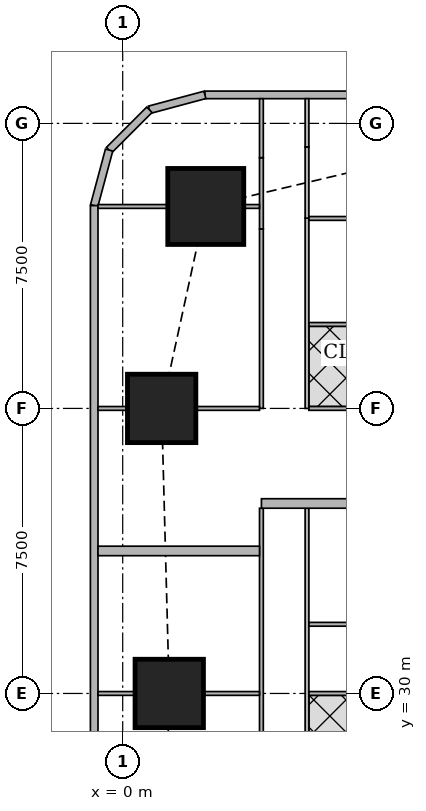
"""IFC4 building model, lengths in metres.
Left out: names, types, materials, properties, quantities, classifications, styles, units other than length and angle.
Written with IfcOpenShell. Run it as: python <this file> out.ifc"""

import sys

from ifc_helpers import new_model, si_unit, direction, frame, frame_2d, origin, origin_2d, place, context, subcontext, project, spatial, rectangle, extrude, element, fill, save


model = new_model("IFC4")
c1 = context("Model", 3, precision=1e-05, world=origin(), true_north=direction((0.0, 1.0)))
c2 = subcontext(c1, "Body", "Model", "MODEL_VIEW")
j1 = project(units=[si_unit("LENGTHUNIT", "METRE"), si_unit("PLANEANGLEUNIT", "RADIAN")], contexts=[c1])
p1 = place(None, origin())
s1 = spatial("IfcSite", under=j1, at=p1, CompositionType="ELEMENT")
p2 = place(p1, origin())
s2 = spatial("IfcBuilding", under=s1, at=p2, CompositionType="ELEMENT")
p3 = place(p2, frame((0.0, 0.0, 169.55)))
s3 = spatial("IfcBuildingStorey", under=s2, at=p3, CompositionType="ELEMENT", Elevation=169.55)
for number, where, z_axis, x_axis in (
    (1, (1.225, 30.0, 0.0), (0.0, 0.0, 1.0), (1.0, 0.0, 0.0)),
    (2, (1.025, 37.5, 0.0), (0.0, 0.0, 1.0), (1.0, 0.0, 0.0)),
):
    element("IfcColumn", number, at=place(p3, frame(where, z_axis=z_axis, x_axis=x_axis)), inside=s3, PredefinedType="COLUMN", context=c2, shape_type="SweptSolid", body=[
        extrude(rectangle(XDim=1.8, YDim=1.8, at=origin_2d()), origin(), (0.0, 0.0, 1.0), 3.75),
    ])
p4 = place(p3, frame((2.186, 42.814, 0.0), z_axis=(0.0, 0.0, 1.0), x_axis=(1.0, 0.0, 0.0)))
e3 = element("IfcColumn", 3, at=p4, inside=s3, PredefinedType="COLUMN", context=c2, shape_type="SweptSolid", body=[
    extrude(rectangle(XDim=2.0, YDim=2.0, at=origin_2d()), origin(), (0.0, 0.0, 1.0), 3.75),
])
p5 = place(p3, frame((40.106, 45.75, 0.0), z_axis=(0.0, 0.0, 1.0), x_axis=(-1.0, 0.0, 0.0)))
e4 = element("IfcWall", 4, at=p5, inside=s3, PredefinedType="SOLIDWALL", context=c2, shape_type="SweptSolid", body=[
    extrude(rectangle(XDim=37.943, YDim=0.2, at=frame_2d((18.971, 0.0))), origin(), (0.0, 0.0, 1.0), 3.5),
])
p6 = place(p5, frame((8.606, 0.0, 0.9)))
e5 = element("IfcOpeningElement", 5, at=p6, cuts=e4, PredefinedType="OPENING", context=c2, shape_type="SweptSolid", body=[
    extrude(rectangle(XDim=1.8, YDim=1.5, at=frame_2d((0.9, 0.75))), frame((0.0, 0.11, 0.0), z_axis=(0.0, -1.0, 0.0), x_axis=(1.0, 0.0, 0.0)), (0.0, 0.0, 1.0), 0.22),
])
p7 = place(p5, frame((12.206, 0.0, 0.9)))
e6 = element("IfcOpeningElement", 6, at=p7, cuts=e4, PredefinedType="OPENING", context=c2, shape_type="SweptSolid", body=[
    extrude(rectangle(XDim=1.8, YDim=1.5, at=frame_2d((0.9, 0.75))), frame((0.0, 0.11, 0.0), z_axis=(0.0, -1.0, 0.0), x_axis=(1.0, 0.0, 0.0)), (0.0, 0.0, 1.0), 0.22),
])
p8 = place(p5, frame((15.806, 0.0, 0.9)))
e7 = element("IfcOpeningElement", 7, at=p8, cuts=e4, PredefinedType="OPENING", context=c2, shape_type="SweptSolid", body=[
    extrude(rectangle(XDim=1.8, YDim=1.5, at=frame_2d((0.9, 0.75))), frame((0.0, 0.11, 0.0), z_axis=(0.0, -1.0, 0.0), x_axis=(1.0, 0.0, 0.0)), (0.0, 0.0, 1.0), 0.22),
])
p9 = place(p5, frame((19.406, 0.0, 0.9)))
e8 = element("IfcOpeningElement", 8, at=p9, cuts=e4, PredefinedType="OPENING", context=c2, shape_type="SweptSolid", body=[
    extrude(rectangle(XDim=1.8, YDim=1.5, at=frame_2d((0.9, 0.75))), frame((0.0, 0.11, 0.0), z_axis=(0.0, -1.0, 0.0), x_axis=(1.0, 0.0, 0.0)), (0.0, 0.0, 1.0), 0.22),
])
p10 = place(p5, frame((23.006, 0.0, 0.9)))
e9 = element("IfcOpeningElement", 9, at=p10, cuts=e4, PredefinedType="OPENING", context=c2, shape_type="SweptSolid", body=[
    extrude(rectangle(XDim=1.8, YDim=1.5, at=frame_2d((0.9, 0.75))), frame((0.0, 0.11, 0.0), z_axis=(0.0, -1.0, 0.0), x_axis=(1.0, 0.0, 0.0)), (0.0, 0.0, 1.0), 0.22),
])
p11 = place(p5, frame((26.606, 0.0, 0.9)))
e10 = element("IfcOpeningElement", 10, at=p11, cuts=e4, PredefinedType="OPENING", context=c2, shape_type="SweptSolid", body=[
    extrude(rectangle(XDim=1.8, YDim=1.5, at=frame_2d((0.9, 0.75))), frame((0.0, 0.11, 0.0), z_axis=(0.0, -1.0, 0.0), x_axis=(1.0, 0.0, 0.0)), (0.0, 0.0, 1.0), 0.22),
])
p12 = place(p3, frame((2.163, 45.75, 0.0), z_axis=(0.0, 0.0, 1.0), x_axis=(-0.965832000415, -0.259168954497, 0.0)))
e11 = element("IfcWall", 11, at=p12, inside=s3, PredefinedType="SOLIDWALL", context=c2, shape_type="SweptSolid", body=[
    extrude(rectangle(XDim=1.513, YDim=0.2, at=frame_2d((0.756, 0.0))), origin(), (0.0, 0.0, 1.0), 3.5),
])
p13 = place(p3, frame((0.702, 45.358, 0.0), z_axis=(0.0, 0.0, 1.0), x_axis=(-0.707106781187, -0.707106781187, 0.0)))
e12 = element("IfcWall", 12, at=p13, inside=s3, PredefinedType="SOLIDWALL", context=c2, shape_type="SweptSolid", body=[
    extrude(rectangle(XDim=1.499, YDim=0.2, at=frame_2d((0.75, 0.0))), origin(), (0.0, 0.0, 1.0), 3.5),
])
p14 = place(p3, frame((-0.358, 44.298, 0.0), z_axis=(0.0, 0.0, 1.0), x_axis=(-0.259168954497, -0.965832000415, 0.0)))
e13 = element("IfcWall", 13, at=p14, inside=s3, PredefinedType="SOLIDWALL", context=c2, shape_type="SweptSolid", body=[
    extrude(rectangle(XDim=1.513, YDim=0.2, at=frame_2d((0.756, 0.0))), origin(), (0.0, 0.0, 1.0), 3.5),
])
p15 = place(p3, frame((-0.75, 42.837, 0.0), z_axis=(0.0, 0.0, 1.0), x_axis=(0.0, -1.0, 0.0)))
e14 = element("IfcWall", 14, at=p15, inside=s3, PredefinedType="SOLIDWALL", context=c2, shape_type="SweptSolid", body=[
    extrude(rectangle(XDim=40.674, YDim=0.2, at=frame_2d((20.337, 0.0))), origin(), (0.0, 0.0, 1.0), 3.5),
])
p16 = place(p15, frame((1.78, 0.0, 0.9)))
e15 = element("IfcOpeningElement", 15, at=p16, cuts=e14, PredefinedType="OPENING", context=c2, shape_type="SweptSolid", body=[
    extrude(rectangle(XDim=1.8, YDim=1.5, at=frame_2d((0.9, 0.75))), frame((0.0, 0.11, 0.0), z_axis=(0.0, -1.0, 0.0), x_axis=(1.0, 0.0, 0.0)), (0.0, 0.0, 1.0), 0.22),
])
p17 = place(p15, frame((6.312, 0.0, 0.9)))
e16 = element("IfcOpeningElement", 16, at=p17, cuts=e14, PredefinedType="OPENING", context=c2, shape_type="SweptSolid", body=[
    extrude(rectangle(XDim=1.8, YDim=1.5, at=frame_2d((0.9, 0.75))), frame((0.0, 0.11, 0.0), z_axis=(0.0, -1.0, 0.0), x_axis=(1.0, 0.0, 0.0)), (0.0, 0.0, 1.0), 0.22),
])
p18 = place(p15, frame((10.062, 0.0, 0.9)))
e17 = element("IfcOpeningElement", 17, at=p18, cuts=e14, PredefinedType="OPENING", context=c2, shape_type="SweptSolid", body=[
    extrude(rectangle(XDim=1.8, YDim=1.5, at=frame_2d((0.9, 0.75))), frame((0.0, 0.11, 0.0), z_axis=(0.0, -1.0, 0.0), x_axis=(1.0, 0.0, 0.0)), (0.0, 0.0, 1.0), 0.22),
])
p19 = place(p15, frame((13.812, 0.0, 0.9)))
e18 = element("IfcOpeningElement", 18, at=p19, cuts=e14, PredefinedType="OPENING", context=c2, shape_type="SweptSolid", body=[
    extrude(rectangle(XDim=1.8, YDim=1.5, at=frame_2d((0.9, 0.75))), frame((0.0, 0.11, 0.0), z_axis=(0.0, -1.0, 0.0), x_axis=(1.0, 0.0, 0.0)), (0.0, 0.0, 1.0), 0.22),
])
p20 = place(p15, frame((17.562, 0.0, 0.9)))
e19 = element("IfcOpeningElement", 19, at=p20, cuts=e14, PredefinedType="OPENING", context=c2, shape_type="SweptSolid", body=[
    extrude(rectangle(XDim=1.8, YDim=1.5, at=frame_2d((0.9, 0.75))), frame((0.0, 0.11, 0.0), z_axis=(0.0, -1.0, 0.0), x_axis=(1.0, 0.0, 0.0)), (0.0, 0.0, 1.0), 0.22),
])
p21 = place(p15, frame((21.312, 0.0, 0.9)))
e20 = element("IfcOpeningElement", 20, at=p21, cuts=e14, PredefinedType="OPENING", context=c2, shape_type="SweptSolid", body=[
    extrude(rectangle(XDim=1.8, YDim=1.5, at=frame_2d((0.9, 0.75))), frame((0.0, 0.11, 0.0), z_axis=(0.0, -1.0, 0.0), x_axis=(1.0, 0.0, 0.0)), (0.0, 0.0, 1.0), 0.22),
])
p22 = place(p15, frame((25.062, 0.0, 0.9)))
e21 = element("IfcOpeningElement", 21, at=p22, cuts=e14, PredefinedType="OPENING", context=c2, shape_type="SweptSolid", body=[
    extrude(rectangle(XDim=1.8, YDim=1.5, at=frame_2d((0.9, 0.75))), frame((0.0, 0.11, 0.0), z_axis=(0.0, -1.0, 0.0), x_axis=(1.0, 0.0, 0.0)), (0.0, 0.0, 1.0), 0.22),
])
p23 = place(p15, frame((28.812, 0.0, 0.9)))
e22 = element("IfcOpeningElement", 22, at=p23, cuts=e14, PredefinedType="OPENING", context=c2, shape_type="SweptSolid", body=[
    extrude(rectangle(XDim=1.8, YDim=1.5, at=frame_2d((0.9, 0.75))), frame((0.0, 0.11, 0.0), z_axis=(0.0, -1.0, 0.0), x_axis=(1.0, 0.0, 0.0)), (0.0, 0.0, 1.0), 0.22),
])
p24 = place(p15, frame((32.562, 0.0, 0.9)))
e23 = element("IfcOpeningElement", 23, at=p24, cuts=e14, PredefinedType="OPENING", context=c2, shape_type="SweptSolid", body=[
    extrude(rectangle(XDim=1.8, YDim=1.5, at=frame_2d((0.9, 0.75))), frame((0.0, 0.11, 0.0), z_axis=(0.0, -1.0, 0.0), x_axis=(1.0, 0.0, 0.0)), (0.0, 0.0, 1.0), 0.22),
])
p25 = place(p15, frame((37.094, 0.0, 0.9)))
e24 = element("IfcOpeningElement", 24, at=p25, cuts=e14, PredefinedType="OPENING", context=c2, shape_type="SweptSolid", body=[
    extrude(rectangle(XDim=1.8, YDim=1.5, at=frame_2d((0.9, 0.75))), frame((0.0, 0.11, 0.0), z_axis=(0.0, -1.0, 0.0), x_axis=(1.0, 0.0, 0.0)), (0.0, 0.0, 1.0), 0.22),
])
p26 = place(p3, frame((3.65, 26.25, 0.0), z_axis=(0.0, 0.0, 1.0), x_axis=(0.0, 1.0, 0.0)))
e25 = element("IfcWall", 25, at=p26, inside=s3, PredefinedType="PARTITIONING", context=c2, shape_type="SweptSolid", body=[
    extrude(rectangle(XDim=8.624, YDim=0.1, at=frame_2d((4.312, 0.0))), origin(), (0.0, 0.0, 1.0), 3.5),
])
p27 = place(p26, frame((1.449, 0.0, 0.0)))
e26 = element("IfcOpeningElement", 26, at=p27, cuts=e25, PredefinedType="OPENING", context=c2, shape_type="SweptSolid", body=[
    extrude(rectangle(XDim=0.9, YDim=2.1, at=frame_2d((0.45, 1.05))), frame((0.0, 0.06, 0.0), z_axis=(0.0, -1.0, 0.0), x_axis=(1.0, 0.0, 0.0)), (0.0, 0.0, 1.0), 0.12),
])
p28 = place(p26, frame((3.95, 0.0, 0.0)))
e27 = element("IfcOpeningElement", 27, at=p28, cuts=e25, PredefinedType="OPENING", context=c2, shape_type="SweptSolid", body=[
    extrude(rectangle(XDim=0.9, YDim=2.1, at=frame_2d((0.45, 1.05))), frame((0.0, 0.06, 0.0), z_axis=(0.0, -1.0, 0.0), x_axis=(1.0, 0.0, 0.0)), (0.0, 0.0, 1.0), 0.12),
])
p29 = place(p3, frame((4.85, 27.499, 0.0), z_axis=(0.0, 0.0, 1.0), x_axis=(0.0, 1.0, 0.0)))
e28 = element("IfcWall", 28, at=p29, inside=s3, PredefinedType="PARTITIONING", context=c2, shape_type="SweptSolid", body=[
    extrude(rectangle(XDim=7.375, YDim=0.1, at=frame_2d((3.688, 0.0))), origin(), (0.0, 0.0, 1.0), 3.5),
])
p30 = place(p29, frame((0.8, 0.0, 0.0)))
e29 = element("IfcOpeningElement", 29, at=p30, cuts=e28, PredefinedType="OPENING", context=c2, shape_type="SweptSolid", body=[
    extrude(rectangle(XDim=0.9, YDim=2.1, at=frame_2d((0.45, 1.05))), frame((0.0, 0.06, 0.0), z_axis=(0.0, -1.0, 0.0), x_axis=(1.0, 0.0, 0.0)), (0.0, 0.0, 1.0), 0.12),
])
p31 = place(p29, frame((2.961, 0.0, 0.0)))
e30 = element("IfcOpeningElement", 30, at=p31, cuts=e28, PredefinedType="OPENING", context=c2, shape_type="SweptSolid", body=[
    extrude(rectangle(XDim=0.9, YDim=2.1, at=frame_2d((0.45, 1.05))), frame((0.0, 0.06, 0.0), z_axis=(0.0, -1.0, 0.0), x_axis=(1.0, 0.0, 0.0)), (0.0, 0.0, 1.0), 0.12),
])
p32 = place(p29, frame((5.461, 0.0, 0.0)))
e31 = element("IfcOpeningElement", 31, at=p32, cuts=e28, PredefinedType="OPENING", context=c2, shape_type="SweptSolid", body=[
    extrude(rectangle(XDim=0.9, YDim=2.1, at=frame_2d((0.45, 1.05))), frame((0.0, 0.06, 0.0), z_axis=(0.0, -1.0, 0.0), x_axis=(1.0, 0.0, 0.0)), (0.0, 0.0, 1.0), 0.12),
])
p33 = place(p3, frame((-0.65, 30.0, 0.0), z_axis=(0.0, 0.0, 1.0), x_axis=(1.0, 0.0, 0.0)))
e32 = element("IfcWall", 32, at=p33, inside=s3, PredefinedType="PARTITIONING", context=c2, shape_type="SweptSolid", body=[
    extrude(rectangle(XDim=0.974, YDim=0.1, at=frame_2d((0.487, 0.0))), origin(), (0.0, 0.0, 1.0), 3.5),
])
p34 = place(p3, frame((2.126, 30.0, 0.0), z_axis=(0.0, 0.0, 1.0), x_axis=(1.0, 0.0, 0.0)))
e33 = element("IfcWall", 33, at=p34, inside=s3, PredefinedType="PARTITIONING", context=c2, shape_type="SweptSolid", body=[
    extrude(rectangle(XDim=1.474, YDim=0.1, at=frame_2d((0.737, 0.0))), origin(), (0.0, 0.0, 1.0), 3.5),
])
p35 = place(p3, frame((4.9, 30.0, 0.0), z_axis=(0.0, 0.0, 1.0), x_axis=(1.0, 0.0, 0.0)))
e34 = element("IfcWall", 34, at=p35, inside=s3, PredefinedType="PARTITIONING", context=c2, shape_type="SweptSolid", body=[
    extrude(rectangle(XDim=1.549, YDim=0.1, at=frame_2d((0.774, 0.0))), origin(), (0.0, 0.0, 1.0), 3.5),
])
p36 = place(p3, frame((4.9, 31.82, 0.0), z_axis=(0.0, 0.0, 1.0), x_axis=(1.0, 0.0, 0.0)))
e35 = element("IfcWall", 35, at=p36, inside=s3, PredefinedType="PARTITIONING", context=c2, shape_type="SweptSolid", body=[
    extrude(rectangle(XDim=3.275, YDim=0.1, at=frame_2d((1.638, 0.0))), origin(), (0.0, 0.0, 1.0), 3.5),
])
p37 = place(p3, frame((3.65, 37.5, 0.0), z_axis=(0.0, 0.0, 1.0), x_axis=(0.0, 1.0, 0.0)))
e36 = element("IfcWall", 36, at=p37, inside=s3, PredefinedType="PARTITIONING", context=c2, shape_type="SweptSolid", body=[
    extrude(rectangle(XDim=4.724, YDim=0.1, at=frame_2d((2.362, 0.0))), origin(), (0.0, 0.0, 1.0), 3.5),
])
p38 = place(p37, frame((0.2, 0.0, 0.0)))
e37 = element("IfcOpeningElement", 37, at=p38, cuts=e36, PredefinedType="OPENING", context=c2, shape_type="SweptSolid", body=[
    extrude(rectangle(XDim=0.9, YDim=2.1, at=frame_2d((0.45, 1.05))), frame((0.0, 0.06, 0.0), z_axis=(0.0, -1.0, 0.0), x_axis=(1.0, 0.0, 0.0)), (0.0, 0.0, 1.0), 0.12),
])
p39 = place(p3, frame((3.65, 42.224, 0.0), z_axis=(0.0, 0.0, 1.0), x_axis=(0.0, 1.0, 0.0)))
e38 = element("IfcWall", 38, at=p39, inside=s3, PredefinedType="PARTITIONING", context=c2, shape_type="SweptSolid", body=[
    extrude(rectangle(XDim=1.873, YDim=0.1, at=frame_2d((0.937, 0.0))), origin(), (0.0, 0.0, 1.0), 2.1),
])
p40 = place(p3, frame((3.65, 44.097, 0.0), z_axis=(0.0, 0.0, 1.0), x_axis=(0.0, 1.0, 0.0)))
e39 = element("IfcWall", 39, at=p40, inside=s3, PredefinedType="PARTITIONING", context=c2, shape_type="SweptSolid", body=[
    extrude(rectangle(XDim=1.553, YDim=0.1, at=frame_2d((0.776, 0.0))), origin(), (0.0, 0.0, 1.0), 3.5),
])
p41 = place(p3, frame((4.85, 37.5, 0.0), z_axis=(0.0, 0.0, 1.0), x_axis=(0.0, 1.0, 0.0)))
e40 = element("IfcWall", 40, at=p41, inside=s3, PredefinedType="PARTITIONING", context=c2, shape_type="SweptSolid", body=[
    extrude(rectangle(XDim=5.007, YDim=0.1, at=frame_2d((2.503, 0.0))), origin(), (0.0, 0.0, 1.0), 3.5),
])
p42 = place(p41, frame((0.655, 0.0, 0.0)))
e41 = element("IfcOpeningElement", 41, at=p42, cuts=e40, PredefinedType="OPENING", context=c2, shape_type="SweptSolid", body=[
    extrude(rectangle(XDim=0.9, YDim=2.1, at=frame_2d((0.45, 1.05))), frame((0.0, 0.06, 0.0), z_axis=(0.0, -1.0, 0.0), x_axis=(1.0, 0.0, 0.0)), (0.0, 0.0, 1.0), 0.12),
])
p43 = place(p41, frame((3.155, 0.0, 0.0)))
e42 = element("IfcOpeningElement", 42, at=p43, cuts=e40, PredefinedType="OPENING", context=c2, shape_type="SweptSolid", body=[
    extrude(rectangle(XDim=0.9, YDim=2.1, at=frame_2d((0.45, 1.05))), frame((0.0, 0.06, 0.0), z_axis=(0.0, -1.0, 0.0), x_axis=(1.0, 0.0, 0.0)), (0.0, 0.0, 1.0), 0.12),
])
p44 = place(p3, frame((4.85, 42.507, 0.0), z_axis=(0.0, 0.0, 1.0), x_axis=(0.0, 1.0, 0.0)))
e43 = element("IfcWall", 43, at=p44, inside=s3, PredefinedType="PARTITIONING", context=c2, shape_type="SweptSolid", body=[
    extrude(rectangle(XDim=1.874, YDim=0.1, at=frame_2d((0.937, 0.0))), origin(), (0.0, 0.0, 1.0), 2.1),
])
p45 = place(p3, frame((4.85, 44.381, 0.0), z_axis=(0.0, 0.0, 1.0), x_axis=(0.0, 1.0, 0.0)))
e44 = element("IfcWall", 44, at=p45, inside=s3, PredefinedType="PARTITIONING", context=c2, shape_type="SweptSolid", body=[
    extrude(rectangle(XDim=1.269, YDim=0.1, at=frame_2d((0.634, 0.0))), origin(), (0.0, 0.0, 1.0), 3.5),
])
p46 = place(p45, frame((0.15, 0.0, 0.0)))
e45 = element("IfcOpeningElement", 45, at=p46, cuts=e44, PredefinedType="OPENING", context=c2, shape_type="SweptSolid", body=[
    extrude(rectangle(XDim=0.9, YDim=2.1, at=frame_2d((0.45, 1.05))), frame((0.0, 0.06, 0.0), z_axis=(0.0, -1.0, 0.0), x_axis=(1.0, 0.0, 0.0)), (0.0, 0.0, 1.0), 0.12),
])
p47 = place(p3, frame((-0.65, 37.5, 0.0), z_axis=(0.0, 0.0, 1.0), x_axis=(1.0, 0.0, 0.0)))
e46 = element("IfcWall", 46, at=p47, inside=s3, PredefinedType="PARTITIONING", context=c2, shape_type="SweptSolid", body=[
    extrude(rectangle(XDim=0.774, YDim=0.1, at=frame_2d((0.387, 0.0))), origin(), (0.0, 0.0, 1.0), 3.5),
])
p48 = place(p3, frame((1.926, 37.5, 0.0), z_axis=(0.0, 0.0, 1.0), x_axis=(1.0, 0.0, 0.0)))
e47 = element("IfcWall", 47, at=p48, inside=s3, PredefinedType="PARTITIONING", context=c2, shape_type="SweptSolid", body=[
    extrude(rectangle(XDim=1.674, YDim=0.1, at=frame_2d((0.837, 0.0))), origin(), (0.0, 0.0, 1.0), 2.1),
])
p49 = place(p3, frame((-0.65, 42.814, 0.0), z_axis=(0.0, 0.0, 1.0), x_axis=(1.0, 0.0, 0.0)))
e48 = element("IfcWall", 48, at=p49, inside=s3, PredefinedType="PARTITIONING", context=c2, shape_type="SweptSolid", body=[
    extrude(rectangle(XDim=1.835, YDim=0.1, at=frame_2d((0.917, 0.0))), origin(), (0.0, 0.0, 1.0), 3.5),
])
p50 = place(p3, frame((3.187, 42.814, 0.0), z_axis=(0.0, 0.0, 1.0), x_axis=(1.0, 0.0, 0.0)))
e49 = element("IfcWall", 49, at=p50, inside=s3, PredefinedType="PARTITIONING", context=c2, shape_type="SweptSolid", body=[
    extrude(rectangle(XDim=0.413, YDim=0.1, at=frame_2d((0.207, 0.0))), origin(), (0.0, 0.0, 1.0), 2.1),
])
p51 = place(p3, frame((4.9, 37.5, 0.0), z_axis=(0.0, 0.0, 1.0), x_axis=(1.0, 0.0, 0.0)))
e50 = element("IfcWall", 50, at=p51, inside=s3, PredefinedType="PARTITIONING", context=c2, shape_type="SweptSolid", body=[
    extrude(rectangle(XDim=1.549, YDim=0.1, at=frame_2d((0.774, 0.0))), origin(), (0.0, 0.0, 1.0), 3.5),
])
for number, where, z_axis, x_axis in (
    (51, (4.9, 42.499, 0.0), (0.0, 0.0, 1.0), (1.0, 0.0, 0.0)),
    (52, (4.9, 39.71, 0.0), (0.0, 0.0, 1.0), (1.0, 0.0, 0.0)),
):
    element("IfcWall", number, at=place(p3, frame(where, z_axis=z_axis, x_axis=x_axis)), inside=s3, PredefinedType="PARTITIONING", context=c2, shape_type="SweptSolid", body=[
        extrude(rectangle(XDim=3.275, YDim=0.1, at=frame_2d((1.638, 0.0))), origin(), (0.0, 0.0, 1.0), 3.5),
    ])
p52 = place(p3, frame((-0.65, 33.75, 0.0), z_axis=(0.0, 0.0, 1.0), x_axis=(1.0, 0.0, 0.0)))
e53 = element("IfcWall", 53, at=p52, inside=s3, PredefinedType="SOLIDWALL", context=c2, shape_type="SweptSolid", body=[
    extrude(rectangle(XDim=4.25, YDim=0.25, at=frame_2d((2.125, 0.0))), origin(), (0.0, 0.0, 1.0), 2.1),
])
p53 = place(p3, frame((3.65, 34.999, 0.0), z_axis=(0.0, 0.0, 1.0), x_axis=(1.0, 0.0, 0.0)))
e54 = element("IfcWall", 54, at=p53, inside=s3, PredefinedType="SOLIDWALL", context=c2, shape_type="SweptSolid", body=[
    extrude(rectangle(XDim=4.525, YDim=0.25, at=frame_2d((2.263, 0.0))), origin(), (0.0, 0.0, 1.0), 3.5),
])
p54 = place(p16, origin())
e55 = element("IfcWindow", 55, at=p54, inside=s3, PartitioningType="SINGLE_PANEL", PredefinedType="WINDOW", context=c2, shape_type="SweptSolid", body=[
    extrude(rectangle(XDim=1.8, YDim=1.5, at=frame_2d((0.9, 0.75))), frame((0.0, 0.03, 0.0), z_axis=(0.0, -1.0, 0.0), x_axis=(1.0, 0.0, 0.0)), (0.0, 0.0, 1.0), 0.06),
])
fill(e15, e55)
p55 = place(p17, origin())
e56 = element("IfcWindow", 56, at=p55, inside=s3, PartitioningType="SINGLE_PANEL", PredefinedType="WINDOW", context=c2, shape_type="SweptSolid", body=[
    extrude(rectangle(XDim=1.8, YDim=1.5, at=frame_2d((0.9, 0.75))), frame((0.0, 0.03, 0.0), z_axis=(0.0, -1.0, 0.0), x_axis=(1.0, 0.0, 0.0)), (0.0, 0.0, 1.0), 0.06),
])
fill(e16, e56)
p56 = place(p18, origin())
e57 = element("IfcWindow", 57, at=p56, inside=s3, PartitioningType="SINGLE_PANEL", PredefinedType="WINDOW", context=c2, shape_type="SweptSolid", body=[
    extrude(rectangle(XDim=1.8, YDim=1.5, at=frame_2d((0.9, 0.75))), frame((0.0, 0.03, 0.0), z_axis=(0.0, -1.0, 0.0), x_axis=(1.0, 0.0, 0.0)), (0.0, 0.0, 1.0), 0.06),
])
fill(e17, e57)
p57 = place(p19, origin())
e58 = element("IfcWindow", 58, at=p57, inside=s3, PartitioningType="SINGLE_PANEL", PredefinedType="WINDOW", context=c2, shape_type="SweptSolid", body=[
    extrude(rectangle(XDim=1.8, YDim=1.5, at=frame_2d((0.9, 0.75))), frame((0.0, 0.03, 0.0), z_axis=(0.0, -1.0, 0.0), x_axis=(1.0, 0.0, 0.0)), (0.0, 0.0, 1.0), 0.06),
])
fill(e18, e58)
p58 = place(p28, origin())
e59 = element("IfcDoor", 59, at=p58, inside=s3, OperationType="SINGLE_SWING_LEFT", PredefinedType="DOOR", context=c2, shape_type="SweptSolid", body=[
    extrude(rectangle(XDim=0.9, YDim=2.1, at=frame_2d((0.45, 1.05))), frame((0.0, 0.025, 0.0), z_axis=(0.0, -1.0, 0.0), x_axis=(1.0, 0.0, 0.0)), (0.0, 0.0, 1.0), 0.05),
])
fill(e27, e59)
p59 = place(p30, origin())
e60 = element("IfcDoor", 60, at=p59, inside=s3, OperationType="SINGLE_SWING_RIGHT", PredefinedType="DOOR", context=c2, shape_type="SweptSolid", body=[
    extrude(rectangle(XDim=0.9, YDim=2.1, at=frame_2d((0.45, 1.05))), frame((0.0, 0.025, 0.0), z_axis=(0.0, -1.0, 0.0), x_axis=(1.0, 0.0, 0.0)), (0.0, 0.0, 1.0), 0.05),
])
fill(e29, e60)
p60 = place(p31, origin())
e61 = element("IfcDoor", 61, at=p60, inside=s3, OperationType="SINGLE_SWING_LEFT", PredefinedType="DOOR", context=c2, shape_type="SweptSolid", body=[
    extrude(rectangle(XDim=0.9, YDim=2.1, at=frame_2d((0.45, 1.05))), frame((0.0, 0.025, 0.0), z_axis=(0.0, -1.0, 0.0), x_axis=(1.0, 0.0, 0.0)), (0.0, 0.0, 1.0), 0.05),
])
fill(e30, e61)
p61 = place(p32, origin())
e62 = element("IfcDoor", 62, at=p61, inside=s3, OperationType="SINGLE_SWING_LEFT", PredefinedType="DOOR", context=c2, shape_type="SweptSolid", body=[
    extrude(rectangle(XDim=0.9, YDim=2.1, at=frame_2d((0.45, 1.05))), frame((0.0, 0.025, 0.0), z_axis=(0.0, -1.0, 0.0), x_axis=(1.0, 0.0, 0.0)), (0.0, 0.0, 1.0), 0.05),
])
fill(e31, e62)
p62 = place(p38, origin())
e63 = element("IfcDoor", 63, at=p62, inside=s3, OperationType="SINGLE_SWING_LEFT", PredefinedType="DOOR", context=c2, shape_type="SweptSolid", body=[
    extrude(rectangle(XDim=0.9, YDim=2.1, at=frame_2d((0.45, 1.05))), frame((0.0, 0.025, 0.0), z_axis=(0.0, -1.0, 0.0), x_axis=(1.0, 0.0, 0.0)), (0.0, 0.0, 1.0), 0.05),
])
fill(e37, e63)
p63 = place(p42, origin())
e64 = element("IfcDoor", 64, at=p63, inside=s3, OperationType="SINGLE_SWING_RIGHT", PredefinedType="DOOR", context=c2, shape_type="SweptSolid", body=[
    extrude(rectangle(XDim=0.9, YDim=2.1, at=frame_2d((0.45, 1.05))), frame((0.0, 0.025, 0.0), z_axis=(0.0, -1.0, 0.0), x_axis=(1.0, 0.0, 0.0)), (0.0, 0.0, 1.0), 0.05),
])
fill(e41, e64)
p64 = place(p46, origin())
e65 = element("IfcDoor", 65, at=p64, inside=s3, OperationType="SINGLE_SWING_RIGHT", PredefinedType="DOOR", context=c2, shape_type="SweptSolid", body=[
    extrude(rectangle(XDim=0.9, YDim=2.1, at=frame_2d((0.45, 1.05))), frame((0.0, 0.025, 0.0), z_axis=(0.0, -1.0, 0.0), x_axis=(1.0, 0.0, 0.0)), (0.0, 0.0, 1.0), 0.05),
])
fill(e45, e65)
p65 = place(p43, origin())
e66 = element("IfcDoor", 66, at=p65, inside=s3, OperationType="SINGLE_SWING_LEFT", PredefinedType="DOOR", context=c2, shape_type="SweptSolid", body=[
    extrude(rectangle(XDim=0.9, YDim=2.1, at=frame_2d((0.45, 1.05))), frame((0.0, 0.025, 0.0), z_axis=(0.0, -1.0, 0.0), x_axis=(1.0, 0.0, 0.0)), (0.0, 0.0, 1.0), 0.05),
])
fill(e42, e66)
save(model, sys.argv[1])
